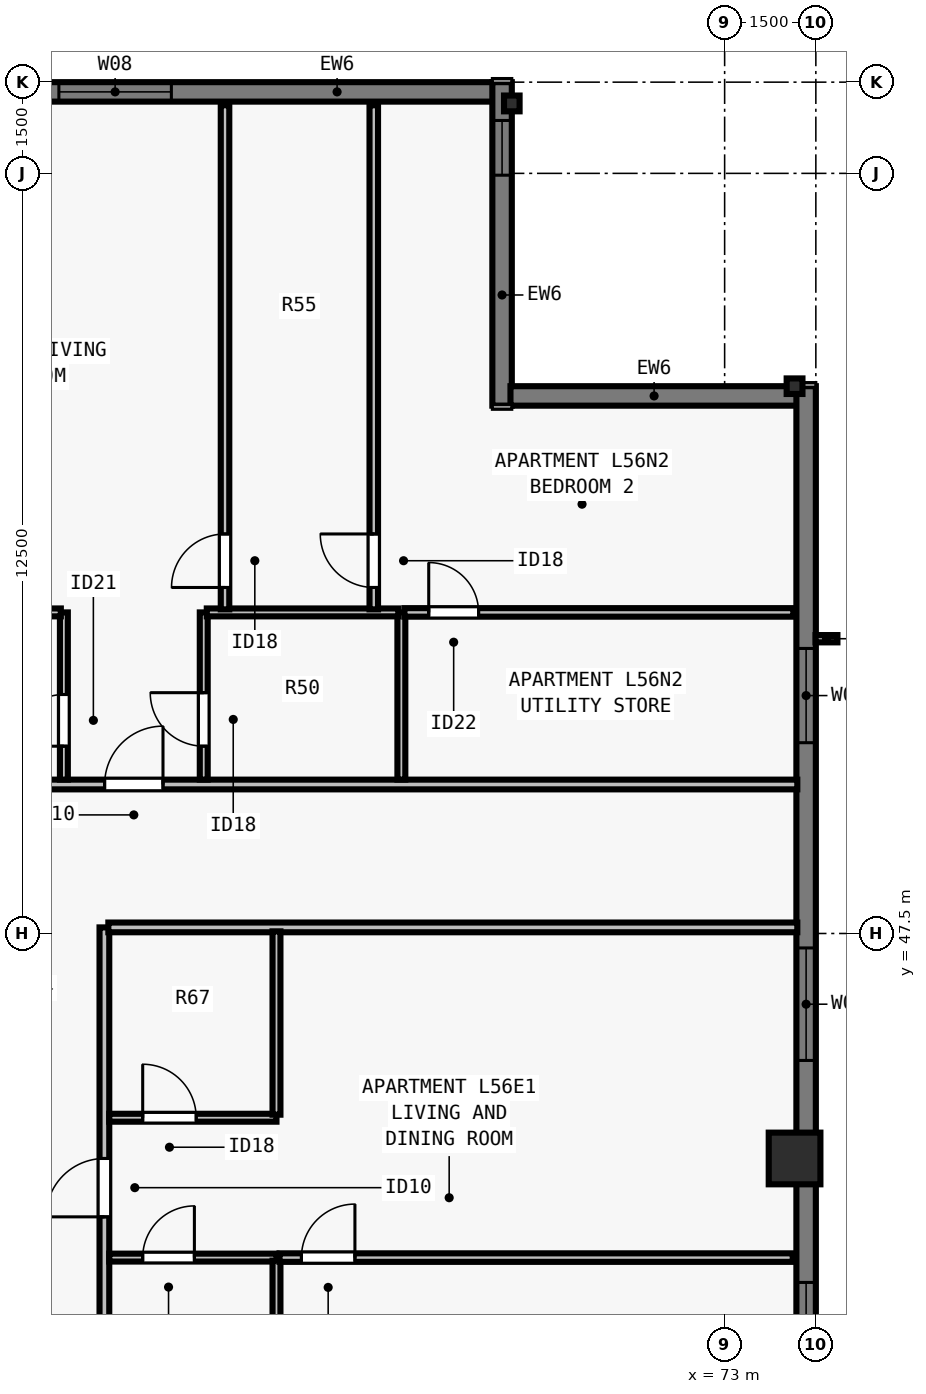
"""IFC4 building model, lengths in metres.
Left out: names, types, materials, properties, quantities, classifications, styles, units other than length and angle.
Written with IfcOpenShell. Run it as: python <this file> out.ifc"""

import sys

from ifc_helpers import new_model, si_unit, direction, frame, frame_2d, origin, origin_2d, place, context, subcontext, project, spatial, rectangle, i_section, extrude, element, fill, save


model = new_model("IFC4")
c1 = context("Model", 3, precision=1e-05, world=origin(), true_north=direction((0.0, 1.0)))
c2 = subcontext(c1, "Body", "Model", "MODEL_VIEW")
j1 = project(units=[si_unit("LENGTHUNIT", "METRE"), si_unit("PLANEANGLEUNIT", "RADIAN")], contexts=[c1])
p1 = place(None, origin())
s1 = spatial("IfcSite", under=j1, at=p1, CompositionType="ELEMENT")
p2 = place(p1, origin())
s2 = spatial("IfcBuilding", under=s1, at=p2, CompositionType="ELEMENT")
p3 = place(p2, frame((0.0, 0.0, 206.0)))
s3 = spatial("IfcBuildingStorey", under=s2, at=p3, CompositionType="ELEMENT", Elevation=206.0)
p4 = place(p3, frame((74.15, 43.8, 0.0), z_axis=(0.0, 0.0, 1.0), x_axis=(0.0, 1.0, 0.0)))
e1 = element("IfcColumn", 1, at=p4, inside=s3, PredefinedType="COLUMN", context=c2, shape_type="SweptSolid", body=[
    extrude(rectangle(XDim=0.85, YDim=0.85, at=origin_2d()), origin(), (0.0, 0.0, 1.0), 3.5),
])
for number, where, z_axis, x_axis in (
    (2, (74.15, 56.5, 0.0), (0.0, 0.0, 1.0), (0.0, 1.0, 0.0)),
    (3, (69.5, 61.15, 0.0), (0.0, 0.0, 1.0), (1.0, 0.0, 0.0)),
):
    element("IfcColumn", number, at=place(p3, frame(where, z_axis=z_axis, x_axis=x_axis)), inside=s3, PredefinedType="COLUMN", context=c2, shape_type="SweptSolid", body=[
        extrude(i_section(OverallWidth=0.256, OverallDepth=0.26, WebThickness=0.01, FlangeThickness=0.017, FilletRadius=0.013, at=origin_2d()), origin(), (0.0, 0.0, 1.0), 3.5),
    ])
p5 = place(p3, frame((54.6, 61.34, 0.0), z_axis=(0.0, 0.0, 1.0), x_axis=(1.0, 0.0, 0.0)))
e4 = element("IfcWall", 4, at=p5, inside=s3, PredefinedType="SOLIDWALL", context=c2, shape_type="SweptSolid", body=[
    extrude(rectangle(XDim=14.602, YDim=0.32, at=frame_2d((7.301, 0.0))), origin(), (0.0, 0.0, 1.0), 3.29),
])
p6 = place(p5, frame((2.851, 0.0, 0.8)))
e5 = element("IfcOpeningElement", 5, at=p6, cuts=e4, PredefinedType="OPENING", context=c2, shape_type="SweptSolid", body=[
    extrude(rectangle(XDim=1.55, YDim=1.678, at=frame_2d((0.775, 0.839))), frame((0.0, 0.17, 0.0), z_axis=(0.0, -1.0, 0.0), x_axis=(1.0, 0.0, 0.0)), (0.0, 0.0, 1.0), 0.34),
])
p7 = place(p5, frame((7.451, 0.0, 0.8)))
e6 = element("IfcOpeningElement", 6, at=p7, cuts=e4, PredefinedType="OPENING", context=c2, shape_type="SweptSolid", body=[
    extrude(rectangle(XDim=1.85, YDim=1.678, at=frame_2d((0.925, 0.839))), frame((0.0, 0.17, 0.0), z_axis=(0.0, -1.0, 0.0), x_axis=(1.0, 0.0, 0.0)), (0.0, 0.0, 1.0), 0.34),
])
p8 = place(p5, frame((0.55, 0.0, 0.8)))
e7 = element("IfcOpeningElement", 7, at=p8, cuts=e4, PredefinedType="OPENING", context=c2, shape_type="SweptSolid", body=[
    extrude(rectangle(XDim=0.9, YDim=1.678, at=frame_2d((0.45, 0.839))), frame((0.0, 0.17, 0.0), z_axis=(0.0, -1.0, 0.0), x_axis=(1.0, 0.0, 0.0)), (0.0, 0.0, 1.0), 0.34),
])
p9 = place(p3, frame((69.34, 61.5, 0.0), z_axis=(0.0, 0.0, 1.0), x_axis=(0.0, -1.0, 0.0)))
e8 = element("IfcWall", 8, at=p9, inside=s3, PredefinedType="SOLIDWALL", context=c2, shape_type="SweptSolid", body=[
    extrude(rectangle(XDim=5.32, YDim=0.32, at=frame_2d((2.66, 0.0))), origin(), (0.0, 0.0, 1.0), 3.29),
])
p10 = place(p9, frame((0.63, 0.0, 0.8)))
e9 = element("IfcOpeningElement", 9, at=p10, cuts=e8, PredefinedType="OPENING", context=c2, shape_type="SweptSolid", body=[
    extrude(rectangle(XDim=0.9, YDim=1.678, at=frame_2d((0.45, 0.839))), frame((0.0, 0.17, 0.0), z_axis=(0.0, -1.0, 0.0), x_axis=(1.0, 0.0, 0.0)), (0.0, 0.0, 1.0), 0.34),
])
p11 = place(p3, frame((69.478, 56.34, 0.0), z_axis=(0.0, 0.0, 1.0), x_axis=(1.0, 0.0, 0.0)))
e10 = element("IfcWall", 10, at=p11, inside=s3, PredefinedType="SOLIDWALL", context=c2, shape_type="SweptSolid", body=[
    extrude(rectangle(XDim=4.724, YDim=0.32, at=frame_2d((2.362, 0.0))), origin(), (0.0, 0.0, 1.0), 3.29),
])
p12 = place(p3, frame((74.34, 56.5, 0.0), z_axis=(0.0, 0.0, 1.0), x_axis=(0.0, -1.0, 0.0)))
e11 = element("IfcWall", 11, at=p12, inside=s3, PredefinedType="SOLIDWALL", context=c2, shape_type="SweptSolid", body=[
    extrude(rectangle(XDim=34.702, YDim=0.32, at=frame_2d((17.351, 0.0))), origin(), (0.0, 0.0, 1.0), 3.29),
])
p13 = place(p12, frame((4.312, 0.0, 0.8)))
e12 = element("IfcOpeningElement", 12, at=p13, cuts=e11, PredefinedType="OPENING", context=c2, shape_type="SweptSolid", body=[
    extrude(rectangle(XDim=1.55, YDim=1.678, at=frame_2d((0.775, 0.839))), frame((0.0, 0.17, 0.0), z_axis=(0.0, -1.0, 0.0), x_axis=(1.0, 0.0, 0.0)), (0.0, 0.0, 1.0), 0.34),
])
p14 = place(p12, frame((9.238, 0.0, 0.8)))
e13 = element("IfcOpeningElement", 13, at=p14, cuts=e11, PredefinedType="OPENING", context=c2, shape_type="SweptSolid", body=[
    extrude(rectangle(XDim=1.85, YDim=1.678, at=frame_2d((0.925, 0.839))), frame((0.0, 0.17, 0.0), z_axis=(0.0, -1.0, 0.0), x_axis=(1.0, 0.0, 0.0)), (0.0, 0.0, 1.0), 0.34),
])
p15 = place(p12, frame((14.738, 0.0, 0.8)))
e14 = element("IfcOpeningElement", 14, at=p15, cuts=e11, PredefinedType="OPENING", context=c2, shape_type="SweptSolid", body=[
    extrude(rectangle(XDim=1.85, YDim=1.678, at=frame_2d((0.925, 0.839))), frame((0.0, 0.17, 0.0), z_axis=(0.0, -1.0, 0.0), x_axis=(1.0, 0.0, 0.0)), (0.0, 0.0, 1.0), 0.34),
])
p16 = place(p12, frame((18.264, 0.0, 0.8)))
e15 = element("IfcOpeningElement", 15, at=p16, cuts=e11, PredefinedType="OPENING", context=c2, shape_type="SweptSolid", body=[
    extrude(rectangle(XDim=1.55, YDim=1.678, at=frame_2d((0.775, 0.839))), frame((0.0, 0.17, 0.0), z_axis=(0.0, -1.0, 0.0), x_axis=(1.0, 0.0, 0.0)), (0.0, 0.0, 1.0), 0.34),
])
p17 = place(p12, frame((24.164, 0.0, 0.8)))
e16 = element("IfcOpeningElement", 16, at=p17, cuts=e11, PredefinedType="OPENING", context=c2, shape_type="SweptSolid", body=[
    extrude(rectangle(XDim=1.55, YDim=1.678, at=frame_2d((0.775, 0.839))), frame((0.0, 0.17, 0.0), z_axis=(0.0, -1.0, 0.0), x_axis=(1.0, 0.0, 0.0)), (0.0, 0.0, 1.0), 0.34),
])
p18 = place(p3, frame((29.805, 49.95, 0.0), z_axis=(0.0, 0.0, 1.0), x_axis=(1.0, 0.0, 0.0)))
e17 = element("IfcWall", 17, at=p18, inside=s3, PredefinedType="PARTITIONING", context=c2, shape_type="SweptSolid", body=[
    extrude(rectangle(XDim=44.39, YDim=0.16, at=frame_2d((22.195, 0.0))), origin(), (0.0, 0.0, 1.0), 2.958),
])
p19 = place(p18, frame((10.919, 0.0, 0.0)))
e18 = element("IfcOpeningElement", 18, at=p19, cuts=e17, PredefinedType="OPENING", context=c2, shape_type="SweptSolid", body=[
    extrude(rectangle(XDim=0.96, YDim=2.18, at=frame_2d((0.48, 1.09))), frame((0.0, 0.09, 0.0), z_axis=(0.0, -1.0, 0.0), x_axis=(1.0, 0.0, 0.0)), (0.0, 0.0, 1.0), 0.18),
])
p20 = place(p18, frame((32.999, 0.0, 0.0)))
e19 = element("IfcOpeningElement", 19, at=p20, cuts=e17, PredefinedType="OPENING", context=c2, shape_type="SweptSolid", body=[
    extrude(rectangle(XDim=0.96, YDim=2.18, at=frame_2d((0.48, 1.09))), frame((0.0, 0.09, 0.0), z_axis=(0.0, -1.0, 0.0), x_axis=(1.0, 0.0, 0.0)), (0.0, 0.0, 1.0), 0.18),
])
p21 = place(p3, frame((62.8, 30.4, 0.0), z_axis=(0.0, 0.0, 1.0), x_axis=(0.0, 1.0, 0.0)))
e20 = element("IfcWall", 20, at=p21, inside=s3, PredefinedType="PARTITIONING", context=c2, shape_type="SweptSolid", body=[
    extrude(rectangle(XDim=17.2, YDim=0.16, at=frame_2d((8.6, 0.0))), origin(), (0.0, 0.0, 1.0), 3.29),
])
p22 = place(p21, frame((3.6, 0.0, 0.0)))
e21 = element("IfcOpeningElement", 21, at=p22, cuts=e20, PredefinedType="OPENING", context=c2, shape_type="SweptSolid", body=[
    extrude(rectangle(XDim=0.96, YDim=2.12, at=frame_2d((0.48, 1.06))), frame((0.0, 0.09, 0.0), z_axis=(0.0, -1.0, 0.0), x_axis=(1.0, 0.0, 0.0)), (0.0, 0.0, 1.0), 0.18),
])
p23 = place(p21, frame((12.44, 0.0, 0.0)))
e22 = element("IfcOpeningElement", 22, at=p23, cuts=e20, PredefinedType="OPENING", context=c2, shape_type="SweptSolid", body=[
    extrude(rectangle(XDim=0.96, YDim=2.18, at=frame_2d((0.48, 1.09))), frame((0.0, 0.09, 0.0), z_axis=(0.0, -1.0, 0.0), x_axis=(1.0, 0.0, 0.0)), (0.0, 0.0, 1.0), 0.18),
])
p24 = place(p3, frame((62.865, 47.6, 0.0), z_axis=(0.0, 0.0, 1.0), x_axis=(1.0, 0.0, 0.0)))
e23 = element("IfcWall", 23, at=p24, inside=s3, PredefinedType="PARTITIONING", context=c2, shape_type="SweptSolid", body=[
    extrude(rectangle(XDim=11.33, YDim=0.16, at=frame_2d((5.665, 0.0))), origin(), (0.0, 0.0, 1.0), 3.29),
])
p25 = place(p3, frame((62.134, 50.03, 0.0), z_axis=(0.0, 0.0, 1.0), x_axis=(0.0, 1.0, 0.0)))
e24 = element("IfcWall", 24, at=p25, inside=s3, PredefinedType="PLUMBINGWALL", context=c2, shape_type="SweptSolid", body=[
    extrude(rectangle(XDim=2.75, YDim=0.13, at=frame_2d((1.375, 0.0))), origin(), (0.0, 0.0, 1.0), 2.573),
])
p26 = place(p25, frame((0.55, 0.0, 0.0)))
e25 = element("IfcOpeningElement", 25, at=p26, cuts=e24, PredefinedType="OPENING", context=c2, shape_type="SweptSolid", body=[
    extrude(rectangle(XDim=0.85, YDim=2.08, at=frame_2d((0.425, 1.04))), frame((0.0, 0.075, 0.0), z_axis=(0.0, -1.0, 0.0), x_axis=(1.0, 0.0, 0.0)), (0.0, 0.0, 1.0), 0.15),
])
p27 = place(p3, frame((59.234, 52.78, 0.0), z_axis=(0.0, 0.0, 1.0), x_axis=(1.0, 0.0, 0.0)))
e26 = element("IfcWall", 26, at=p27, inside=s3, PredefinedType="PLUMBINGWALL", context=c2, shape_type="SweptSolid", body=[
    extrude(rectangle(XDim=2.85, YDim=0.13, at=frame_2d((1.425, 0.0))), origin(), (0.0, 0.0, 1.0), 3.29),
])
p28 = place(p3, frame((67.684, 50.03, 0.0), z_axis=(0.0, 0.0, 1.0), x_axis=(0.0, 1.0, 0.0)))
e27 = element("IfcWall", 27, at=p28, inside=s3, PredefinedType="PLUMBINGWALL", context=c2, shape_type="SweptSolid", body=[
    extrude(rectangle(XDim=2.75, YDim=0.13, at=frame_2d((1.375, 0.0))), origin(), (0.0, 0.0, 1.0), 3.29),
])
p29 = place(p3, frame((64.434, 50.03, 0.0), z_axis=(0.0, 0.0, 1.0), x_axis=(0.0, 1.0, 0.0)))
e28 = element("IfcWall", 28, at=p29, inside=s3, PredefinedType="PLUMBINGWALL", context=c2, shape_type="SweptSolid", body=[
    extrude(rectangle(XDim=2.75, YDim=0.13, at=frame_2d((1.375, 0.0))), origin(), (0.0, 0.0, 1.0), 3.29),
])
p30 = place(p29, frame((0.55, 0.0, 0.0)))
e29 = element("IfcOpeningElement", 29, at=p30, cuts=e28, PredefinedType="OPENING", context=c2, shape_type="SweptSolid", body=[
    extrude(rectangle(XDim=0.88, YDim=2.1, at=frame_2d((0.44, 1.05))), frame((0.0, 0.075, 0.0), z_axis=(0.0, -1.0, 0.0), x_axis=(1.0, 0.0, 0.0)), (0.0, 0.0, 1.0), 0.15),
])
p31 = place(p3, frame((64.484, 52.78, 0.0), z_axis=(0.0, 0.0, 1.0), x_axis=(1.0, 0.0, 0.0)))
e30 = element("IfcWall", 30, at=p31, inside=s3, PredefinedType="PLUMBINGWALL", context=c2, shape_type="SweptSolid", body=[
    extrude(rectangle(XDim=3.15, YDim=0.13, at=frame_2d((1.575, 0.0))), origin(), (0.0, 0.0, 1.0), 3.29),
])
p32 = place(p3, frame((67.23, 52.83, 0.0), z_axis=(0.0, 0.0, 1.0), x_axis=(0.0, 1.0, 0.0)))
e31 = element("IfcWall", 31, at=p32, inside=s3, PredefinedType="PARTITIONING", context=c2, shape_type="SweptSolid", body=[
    extrude(rectangle(XDim=8.29, YDim=0.14, at=frame_2d((4.145, 0.0))), origin(), (0.0, 0.0, 1.0), 2.573),
])
p33 = place(p32, frame((0.36, 0.0, 0.0)))
e32 = element("IfcOpeningElement", 32, at=p33, cuts=e31, PredefinedType="OPENING", context=c2, shape_type="SweptSolid", body=[
    extrude(rectangle(XDim=0.88, YDim=2.1, at=frame_2d((0.44, 1.05))), frame((0.0, 0.08, 0.0), z_axis=(0.0, -1.0, 0.0), x_axis=(1.0, 0.0, 0.0)), (0.0, 0.0, 1.0), 0.16),
])
p34 = place(p3, frame((67.734, 52.78, 0.0), z_axis=(0.0, 0.0, 1.0), x_axis=(1.0, 0.0, 0.0)))
e33 = element("IfcWall", 33, at=p34, inside=s3, PredefinedType="PARTITIONING", context=c2, shape_type="SweptSolid", body=[
    extrude(rectangle(XDim=6.396, YDim=0.14, at=frame_2d((3.198, 0.0))), origin(), (0.0, 0.0, 1.0), 2.958),
])
p35 = place(p34, frame((0.4, 0.0, 0.0)))
e34 = element("IfcOpeningElement", 34, at=p35, cuts=e33, PredefinedType="OPENING", context=c2, shape_type="SweptSolid", body=[
    extrude(rectangle(XDim=0.82, YDim=2.1, at=frame_2d((0.41, 1.05))), frame((0.0, 0.08, 0.0), z_axis=(0.0, -1.0, 0.0), x_axis=(1.0, 0.0, 0.0)), (0.0, 0.0, 1.0), 0.16),
])
p36 = place(p3, frame((64.784, 52.83, 0.0), z_axis=(0.0, 0.0, 1.0), x_axis=(0.0, 1.0, 0.0)))
e35 = element("IfcWall", 35, at=p36, inside=s3, PredefinedType="PARTITIONING", context=c2, shape_type="SweptSolid", body=[
    extrude(rectangle(XDim=8.29, YDim=0.14, at=frame_2d((4.145, 0.0))), origin(), (0.0, 0.0, 1.0), 2.573),
])
p37 = place(p36, frame((0.36, 0.0, 0.0)))
e36 = element("IfcOpeningElement", 36, at=p37, cuts=e35, PredefinedType="OPENING", context=c2, shape_type="SweptSolid", body=[
    extrude(rectangle(XDim=0.88, YDim=2.1, at=frame_2d((0.44, 1.05))), frame((0.0, 0.08, 0.0), z_axis=(0.0, -1.0, 0.0), x_axis=(1.0, 0.0, 0.0)), (0.0, 0.0, 1.0), 0.16),
])
p38 = place(p3, frame((62.88, 42.17, 0.0), z_axis=(0.0, 0.0, 1.0), x_axis=(1.0, 0.0, 0.0)))
e37 = element("IfcWall", 37, at=p38, inside=s3, PredefinedType="PLUMBINGWALL", context=c2, shape_type="SweptSolid", body=[
    extrude(rectangle(XDim=2.75, YDim=0.13, at=frame_2d((1.375, 0.0))), origin(), (0.0, 0.0, 1.0), 3.29),
])
p39 = place(p38, frame((0.55, 0.0, 0.0)))
e38 = element("IfcOpeningElement", 38, at=p39, cuts=e37, PredefinedType="OPENING", context=c2, shape_type="SweptSolid", body=[
    extrude(rectangle(XDim=0.85, YDim=2.08, at=frame_2d((0.425, 1.04))), frame((0.0, 0.075, 0.0), z_axis=(0.0, -1.0, 0.0), x_axis=(1.0, 0.0, 0.0)), (0.0, 0.0, 1.0), 0.15),
])
p40 = place(p3, frame((65.63, 39.18, 0.0), z_axis=(0.0, 0.0, 1.0), x_axis=(0.0, 1.0, 0.0)))
e39 = element("IfcWall", 39, at=p40, inside=s3, PredefinedType="PLUMBINGWALL", context=c2, shape_type="SweptSolid", body=[
    extrude(rectangle(XDim=2.94, YDim=0.13, at=frame_2d((1.47, 0.0))), origin(), (0.0, 0.0, 1.0), 3.29),
])
p41 = place(p3, frame((62.88, 44.47, 0.0), z_axis=(0.0, 0.0, 1.0), x_axis=(1.0, 0.0, 0.0)))
e40 = element("IfcWall", 40, at=p41, inside=s3, PredefinedType="PLUMBINGWALL", context=c2, shape_type="SweptSolid", body=[
    extrude(rectangle(XDim=2.75, YDim=0.13, at=frame_2d((1.375, 0.0))), origin(), (0.0, 0.0, 1.0), 3.29),
])
p42 = place(p41, frame((0.55, 0.0, 0.0)))
e41 = element("IfcOpeningElement", 41, at=p42, cuts=e40, PredefinedType="OPENING", context=c2, shape_type="SweptSolid", body=[
    extrude(rectangle(XDim=0.88, YDim=2.1, at=frame_2d((0.44, 1.05))), frame((0.0, 0.075, 0.0), z_axis=(0.0, -1.0, 0.0), x_axis=(1.0, 0.0, 0.0)), (0.0, 0.0, 1.0), 0.15),
])
p43 = place(p3, frame((65.63, 44.52, 0.0), z_axis=(0.0, 0.0, 1.0), x_axis=(0.0, 1.0, 0.0)))
e42 = element("IfcWall", 42, at=p43, inside=s3, PredefinedType="PLUMBINGWALL", context=c2, shape_type="SweptSolid", body=[
    extrude(rectangle(XDim=3.015, YDim=0.13, at=frame_2d((1.507, 0.0))), origin(), (0.0, 0.0, 1.0), 3.29),
])
p44 = place(p3, frame((65.68, 42.17, 0.0), z_axis=(0.0, 0.0, 1.0), x_axis=(1.0, 0.0, 0.0)))
e43 = element("IfcWall", 43, at=p44, inside=s3, PredefinedType="PARTITIONING", context=c2, shape_type="SweptSolid", body=[
    extrude(rectangle(XDim=8.44, YDim=0.14, at=frame_2d((4.22, 0.0))), origin(), (0.0, 0.0, 1.0), 3.29),
])
p45 = place(p44, frame((0.36, 0.0, 0.0)))
e44 = element("IfcOpeningElement", 44, at=p45, cuts=e43, PredefinedType="OPENING", context=c2, shape_type="SweptSolid", body=[
    extrude(rectangle(XDim=0.88, YDim=2.1, at=frame_2d((0.44, 1.05))), frame((0.0, 0.08, 0.0), z_axis=(0.0, -1.0, 0.0), x_axis=(1.0, 0.0, 0.0)), (0.0, 0.0, 1.0), 0.16),
])
p46 = place(p7, origin())
e45 = element("IfcWindow", 45, at=p46, inside=s3, PartitioningType="SINGLE_PANEL", PredefinedType="WINDOW", context=c2, shape_type="SweptSolid", body=[
    extrude(rectangle(XDim=1.85, YDim=1.678, at=frame_2d((0.925, 0.839))), frame((0.0, -0.05, 0.0), z_axis=(0.0, -1.0, 0.0), x_axis=(1.0, 0.0, 0.0)), (0.0, 0.0, 1.0), 0.06),
])
fill(e6, e45)
p47 = place(p13, origin())
e46 = element("IfcWindow", 46, at=p47, inside=s3, PartitioningType="SINGLE_PANEL", PredefinedType="WINDOW", context=c2, shape_type="SweptSolid", body=[
    extrude(rectangle(XDim=1.55, YDim=1.678, at=frame_2d((0.775, 0.839))), frame((0.0, -0.05, 0.0), z_axis=(0.0, -1.0, 0.0), x_axis=(1.0, 0.0, 0.0)), (0.0, 0.0, 1.0), 0.06),
])
fill(e12, e46)
p48 = place(p14, origin())
e47 = element("IfcWindow", 47, at=p48, inside=s3, PartitioningType="SINGLE_PANEL", PredefinedType="WINDOW", context=c2, shape_type="SweptSolid", body=[
    extrude(rectangle(XDim=1.85, YDim=1.678, at=frame_2d((0.925, 0.839))), frame((0.0, -0.05, 0.0), z_axis=(0.0, -1.0, 0.0), x_axis=(1.0, 0.0, 0.0)), (0.0, 0.0, 1.0), 0.06),
])
fill(e13, e47)
p49 = place(p15, origin())
e48 = element("IfcWindow", 48, at=p49, inside=s3, PartitioningType="SINGLE_PANEL", PredefinedType="WINDOW", context=c2, shape_type="SweptSolid", body=[
    extrude(rectangle(XDim=1.85, YDim=1.678, at=frame_2d((0.925, 0.839))), frame((0.0, -0.05, 0.0), z_axis=(0.0, -1.0, 0.0), x_axis=(1.0, 0.0, 0.0)), (0.0, 0.0, 1.0), 0.06),
])
fill(e14, e48)
p50 = place(p10, origin())
e49 = element("IfcWindow", 49, at=p50, inside=s3, PartitioningType="SINGLE_PANEL", PredefinedType="WINDOW", context=c2, shape_type="SweptSolid", body=[
    extrude(rectangle(XDim=0.9, YDim=1.678, at=frame_2d((0.45, 0.839))), frame((0.0, -0.04, 0.0), z_axis=(0.0, -1.0, 0.0), x_axis=(1.0, 0.0, 0.0)), (0.0, 0.0, 1.0), 0.06),
])
fill(e9, e49)
p51 = place(p26, origin())
e50 = element("IfcDoor", 50, at=p51, inside=s3, OperationType="SINGLE_SWING_LEFT", PredefinedType="DOOR", context=c2, shape_type="SweptSolid", body=[
    extrude(rectangle(XDim=0.85, YDim=2.08, at=frame_2d((0.425, 1.04))), frame((0.0, 0.025, 0.0), z_axis=(0.0, -1.0, 0.0), x_axis=(1.0, 0.0, 0.0)), (0.0, 0.0, 1.0), 0.05),
])
fill(e25, e50)
p52 = place(p30, origin())
e51 = element("IfcDoor", 51, at=p52, inside=s3, OperationType="SINGLE_SWING_RIGHT", PredefinedType="DOOR", context=c2, shape_type="SweptSolid", body=[
    extrude(rectangle(XDim=0.88, YDim=2.1, at=frame_2d((0.44, 1.05))), frame((0.0, 0.025, 0.0), z_axis=(0.0, -1.0, 0.0), x_axis=(1.0, 0.0, 0.0)), (0.0, 0.0, 1.0), 0.05),
])
fill(e29, e51)
p53 = place(p35, origin())
e52 = element("IfcDoor", 52, at=p53, inside=s3, OperationType="SINGLE_SWING_LEFT", PredefinedType="DOOR", context=c2, shape_type="SweptSolid", body=[
    extrude(rectangle(XDim=0.82, YDim=2.1, at=frame_2d((0.41, 1.05))), frame((0.0, 0.025, 0.0), z_axis=(0.0, -1.0, 0.0), x_axis=(1.0, 0.0, 0.0)), (0.0, 0.0, 1.0), 0.05),
])
fill(e34, e52)
p54 = place(p33, origin())
e53 = element("IfcDoor", 53, at=p54, inside=s3, OperationType="SINGLE_SWING_RIGHT", PredefinedType="DOOR", context=c2, shape_type="SweptSolid", body=[
    extrude(rectangle(XDim=0.88, YDim=2.1, at=frame_2d((0.44, 1.05))), frame((0.0, 0.025, 0.0), z_axis=(0.0, -1.0, 0.0), x_axis=(1.0, 0.0, 0.0)), (0.0, 0.0, 1.0), 0.05),
])
fill(e32, e53)
p55 = place(p37, origin())
e54 = element("IfcDoor", 54, at=p55, inside=s3, OperationType="SINGLE_SWING_LEFT", PredefinedType="DOOR", context=c2, shape_type="SweptSolid", body=[
    extrude(rectangle(XDim=0.88, YDim=2.1, at=frame_2d((0.44, 1.05))), frame((0.0, 0.025, 0.0), z_axis=(0.0, -1.0, 0.0), x_axis=(1.0, 0.0, 0.0)), (0.0, 0.0, 1.0), 0.05),
])
fill(e36, e54)
p56 = place(p20, origin())
e55 = element("IfcDoor", 55, at=p56, inside=s3, OperationType="SINGLE_SWING_RIGHT", PredefinedType="DOOR", context=c2, shape_type="SweptSolid", body=[
    extrude(rectangle(XDim=0.96, YDim=2.18, at=frame_2d((0.48, 1.09))), frame((0.0, 0.025, 0.0), z_axis=(0.0, -1.0, 0.0), x_axis=(1.0, 0.0, 0.0)), (0.0, 0.0, 1.0), 0.05),
])
fill(e19, e55)
p57 = place(p39, origin())
e56 = element("IfcDoor", 56, at=p57, inside=s3, OperationType="SINGLE_SWING_RIGHT", PredefinedType="DOOR", context=c2, shape_type="SweptSolid", body=[
    extrude(rectangle(XDim=0.85, YDim=2.08, at=frame_2d((0.425, 1.04))), frame((0.0, 0.025, 0.0), z_axis=(0.0, -1.0, 0.0), x_axis=(1.0, 0.0, 0.0)), (0.0, 0.0, 1.0), 0.05),
])
fill(e38, e56)
p58 = place(p42, origin())
e57 = element("IfcDoor", 57, at=p58, inside=s3, OperationType="SINGLE_SWING_LEFT", PredefinedType="DOOR", context=c2, shape_type="SweptSolid", body=[
    extrude(rectangle(XDim=0.88, YDim=2.1, at=frame_2d((0.44, 1.05))), frame((0.0, 0.025, 0.0), z_axis=(0.0, -1.0, 0.0), x_axis=(1.0, 0.0, 0.0)), (0.0, 0.0, 1.0), 0.05),
])
fill(e41, e57)
p59 = place(p45, origin())
e58 = element("IfcDoor", 58, at=p59, inside=s3, OperationType="SINGLE_SWING_RIGHT", PredefinedType="DOOR", context=c2, shape_type="SweptSolid", body=[
    extrude(rectangle(XDim=0.88, YDim=2.1, at=frame_2d((0.44, 1.05))), frame((0.0, 0.025, 0.0), z_axis=(0.0, -1.0, 0.0), x_axis=(1.0, 0.0, 0.0)), (0.0, 0.0, 1.0), 0.05),
])
fill(e44, e58)
p60 = place(p23, origin())
e59 = element("IfcDoor", 59, at=p60, inside=s3, OperationType="SINGLE_SWING_LEFT", PredefinedType="DOOR", context=c2, shape_type="SweptSolid", body=[
    extrude(rectangle(XDim=0.96, YDim=2.18, at=frame_2d((0.48, 1.09))), frame((0.0, 0.025, 0.0), z_axis=(0.0, -1.0, 0.0), x_axis=(1.0, 0.0, 0.0)), (0.0, 0.0, 1.0), 0.05),
])
fill(e22, e59)
save(model, sys.argv[1])
